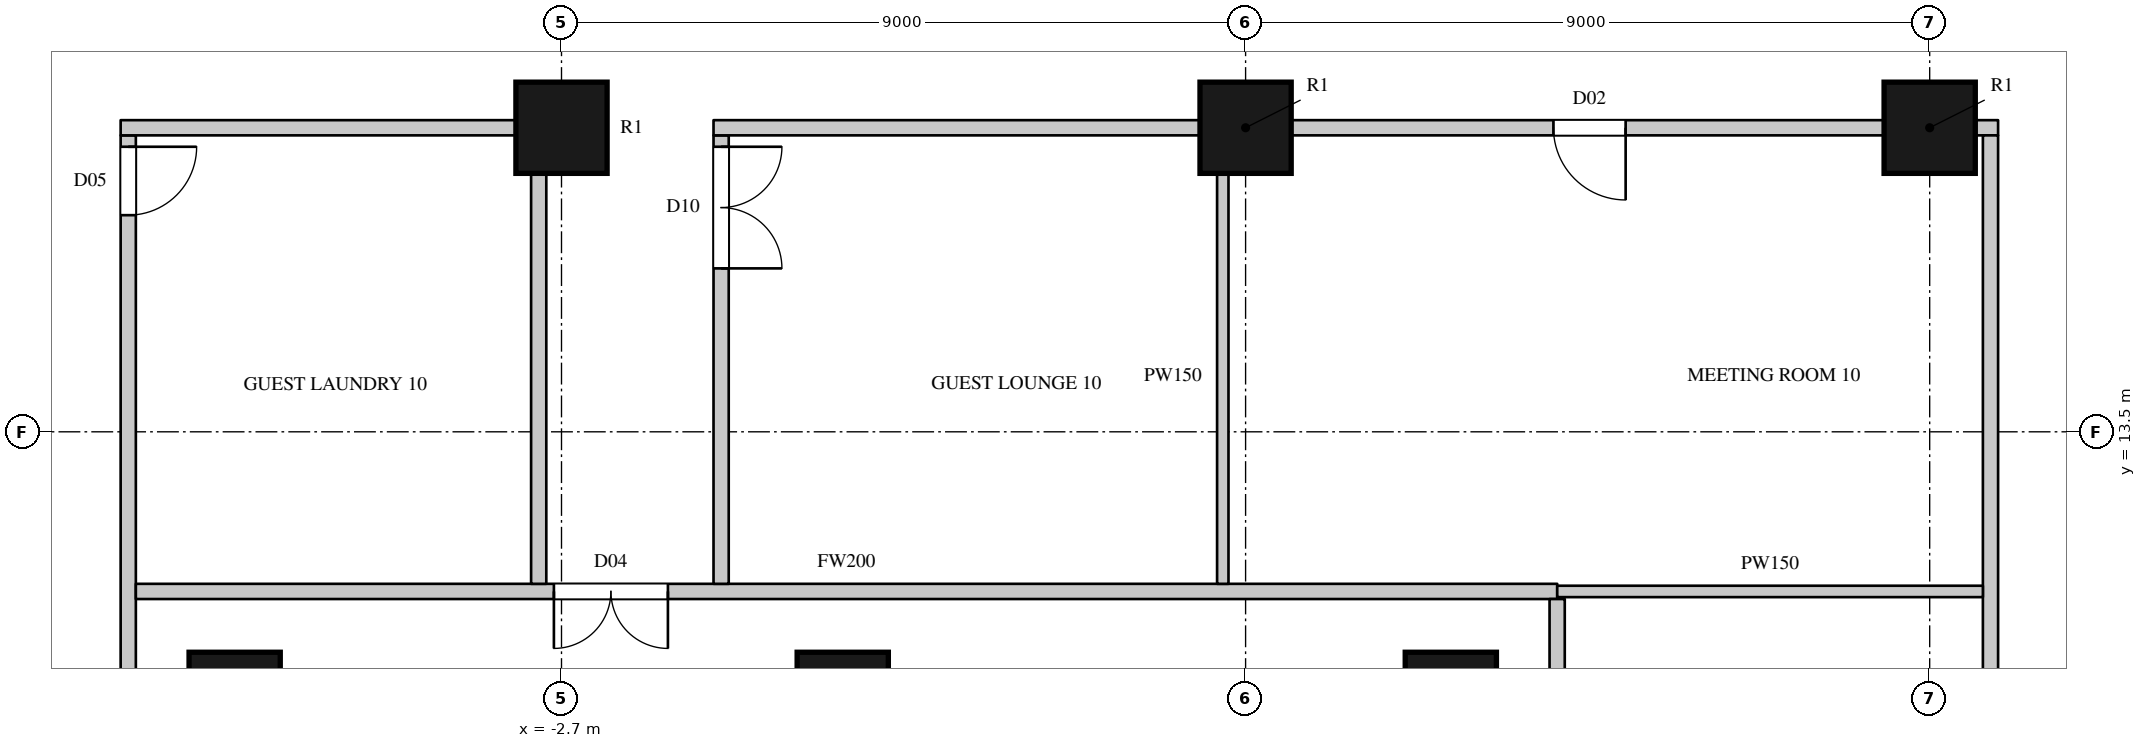
"""IFC4 building model, lengths in metres.
Left out: names, types, materials, properties, quantities, classifications, styles, units other than length and angle.
Written with IfcOpenShell. Run it as: python <this file> out.ifc"""

import sys

from ifc_helpers import new_model, si_unit, direction, frame, frame_2d, origin, origin_2d, place, context, subcontext, project, spatial, rectangle, circle, extrude, element, fill, save


model = new_model("IFC4")
c1 = context("Model", 3, precision=1e-05, world=origin(), true_north=direction((0.0, 1.0)))
c2 = subcontext(c1, "Body", "Model", "MODEL_VIEW")
j1 = project(units=[si_unit("LENGTHUNIT", "METRE"), si_unit("PLANEANGLEUNIT", "RADIAN")], contexts=[c1])
p1 = place(None, origin())
s1 = spatial("IfcSite", under=j1, at=p1, CompositionType="ELEMENT")
p2 = place(p1, origin())
s2 = spatial("IfcBuilding", under=s1, at=p2, CompositionType="ELEMENT")
p3 = place(p2, frame((0.0, 0.0, 66.3)))
s3 = spatial("IfcBuildingStorey", under=s2, at=p3, CompositionType="ELEMENT", Elevation=66.3)
for number, where, z_axis, x_axis in (
    (1, (-2.7, 17.5, 0.0), (0.0, 0.0, 1.0), (1.0, 0.0, 0.0)),
    (2, (6.3, 17.5, 0.0), (0.0, 0.0, 1.0), (1.0, 0.0, 0.0)),
    (3, (15.3, 17.5, 0.0), (0.0, 0.0, 1.0), (1.0, 0.0, 0.0)),
    (4, (-7.0, 10.0, 0.0), (0.0, 0.0, 1.0), (1.0, 0.0, 0.0)),
    (5, (1.0, 10.0, 0.0), (0.0, 0.0, 1.0), (1.0, 0.0, 0.0)),
    (6, (9.0, 10.0, 0.0), (0.0, 0.0, 1.0), (1.0, 0.0, 0.0)),
):
    element("IfcColumn", number, at=place(p3, frame(where, z_axis=z_axis, x_axis=x_axis)), inside=s3, PredefinedType="COLUMN", context=c2, shape_type="SweptSolid", body=[
        extrude(circle(Radius=0.6, at=origin_2d()), origin(), (0.0, 0.0, 1.0), 3.6),
    ])
p4 = place(p3, frame((-8.4, -17.4, 0.0), z_axis=(0.0, 0.0, 1.0), x_axis=(0.0, 1.0, 0.0)))
e7 = element("IfcWall", 7, at=p4, inside=s3, PredefinedType="PARTITIONING", context=c2, shape_type="SweptSolid", body=[
    extrude(rectangle(XDim=34.8, YDim=0.2, at=frame_2d((17.4, 0.0))), origin(), (0.0, 0.0, 1.0), 3.3),
])
p5 = place(p4, frame((21.15, 0.0, 0.0)))
e8 = element("IfcOpeningElement", 8, at=p5, cuts=e7, PredefinedType="OPENING", context=c2, shape_type="SweptSolid", body=[
    extrude(rectangle(XDim=1.5, YDim=2.2, at=frame_2d((0.75, 1.1))), frame((0.0, 0.11, 0.0), z_axis=(0.0, -1.0, 0.0), x_axis=(1.0, 0.0, 0.0)), (0.0, 0.0, 1.0), 0.22),
])
p6 = place(p4, frame((33.75, 0.0, 0.0)))
e9 = element("IfcOpeningElement", 9, at=p6, cuts=e7, PredefinedType="OPENING", context=c2, shape_type="SweptSolid", body=[
    extrude(rectangle(XDim=0.9, YDim=2.2, at=frame_2d((0.45, 1.1))), frame((0.0, 0.11, 0.0), z_axis=(0.0, -1.0, 0.0), x_axis=(1.0, 0.0, 0.0)), (0.0, 0.0, 1.0), 0.22),
])
p7 = place(p4, frame((0.15, 0.0, 0.0)))
e10 = element("IfcOpeningElement", 10, at=p7, cuts=e7, PredefinedType="OPENING", context=c2, shape_type="SweptSolid", body=[
    extrude(rectangle(XDim=0.95, YDim=2.2, at=frame_2d((0.475, 1.1))), frame((0.0, 0.11, 0.0), z_axis=(0.0, -1.0, 0.0), x_axis=(1.0, 0.0, 0.0)), (0.0, 0.0, 1.0), 0.22),
])
p8 = place(p3, frame((-8.3, 11.4, 0.0), z_axis=(0.0, 0.0, 1.0), x_axis=(1.0, 0.0, 0.0)))
e11 = element("IfcWall", 11, at=p8, inside=s3, PredefinedType="PARTITIONING", context=c2, shape_type="SweptSolid", body=[
    extrude(rectangle(XDim=18.7, YDim=0.2, at=frame_2d((9.35, 0.0))), origin(), (0.0, 0.0, 1.0), 3.3),
])
p9 = place(p8, frame((5.5, 0.0, 0.0)))
e12 = element("IfcOpeningElement", 12, at=p9, cuts=e11, PredefinedType="OPENING", context=c2, shape_type="SweptSolid", body=[
    extrude(rectangle(XDim=1.5, YDim=2.2, at=frame_2d((0.75, 1.1))), frame((0.0, 0.11, 0.0), z_axis=(0.0, -1.0, 0.0), x_axis=(1.0, 0.0, 0.0)), (0.0, 0.0, 1.0), 0.22),
])
p10 = place(p3, frame((-8.5, 17.5, 0.0), z_axis=(0.0, 0.0, 1.0), x_axis=(1.0, 0.0, 0.0)))
e13 = element("IfcWall", 13, at=p10, inside=s3, PredefinedType="PARTITIONING", context=c2, shape_type="SweptSolid", body=[
    extrude(rectangle(XDim=5.2, YDim=0.2, at=frame_2d((2.6, 0.0))), origin(), (0.0, 0.0, 1.0), 2.75),
])
p11 = place(p3, frame((-3.0, 11.5, 0.0), z_axis=(0.0, 0.0, 1.0), x_axis=(0.0, 1.0, 0.0)))
e14 = element("IfcWall", 14, at=p11, inside=s3, PredefinedType="PARTITIONING", context=c2, shape_type="SweptSolid", body=[
    extrude(rectangle(XDim=5.443, YDim=0.2, at=frame_2d((2.722, 0.0))), origin(), (0.0, 0.0, 1.0), 3.3),
])
p12 = place(p3, frame((-0.6, 11.5, 0.0), z_axis=(0.0, 0.0, 1.0), x_axis=(0.0, 1.0, 0.0)))
e15 = element("IfcWall", 15, at=p12, inside=s3, PredefinedType="PARTITIONING", context=c2, shape_type="SweptSolid", body=[
    extrude(rectangle(XDim=5.9, YDim=0.2, at=frame_2d((2.95, 0.0))), origin(), (0.0, 0.0, 1.0), 3.3),
])
p13 = place(p12, frame((4.15, 0.0, 0.0)))
e16 = element("IfcOpeningElement", 16, at=p13, cuts=e15, PredefinedType="OPENING", context=c2, shape_type="SweptSolid", body=[
    extrude(rectangle(XDim=1.6, YDim=2.4, at=frame_2d((0.8, 1.2))), frame((0.0, 0.11, 0.0), z_axis=(0.0, -1.0, 0.0), x_axis=(1.0, 0.0, 0.0)), (0.0, 0.0, 1.0), 0.22),
])
p14 = place(p3, frame((-0.7, 17.5, 0.0), z_axis=(0.0, 0.0, 1.0), x_axis=(1.0, 0.0, 0.0)))
e17 = element("IfcWall", 17, at=p14, inside=s3, PredefinedType="PARTITIONING", context=c2, shape_type="SweptSolid", body=[
    extrude(rectangle(XDim=6.4, YDim=0.2, at=frame_2d((3.2, 0.0))), origin(), (0.0, 0.0, 1.0), 2.75),
])
p15 = place(p3, frame((6.9, 17.5, 0.0), z_axis=(0.0, 0.0, 1.0), x_axis=(1.0, 0.0, 0.0)))
e18 = element("IfcWall", 18, at=p15, inside=s3, PredefinedType="PARTITIONING", context=c2, shape_type="SweptSolid", body=[
    extrude(rectangle(XDim=7.8, YDim=0.2, at=frame_2d((3.9, 0.0))), origin(), (0.0, 0.0, 1.0), 2.75),
])
p16 = place(p15, frame((3.45, 0.0, 0.0)))
e19 = element("IfcOpeningElement", 19, at=p16, cuts=e18, PredefinedType="OPENING", context=c2, shape_type="SweptSolid", body=[
    extrude(rectangle(XDim=0.95, YDim=2.2, at=frame_2d((0.475, 1.1))), frame((0.0, 0.11, 0.0), z_axis=(0.0, -1.0, 0.0), x_axis=(1.0, 0.0, 0.0)), (0.0, 0.0, 1.0), 0.22),
])
p17 = place(p3, frame((15.9, 17.5, 0.0), z_axis=(0.0, 0.0, 1.0), x_axis=(1.0, 0.0, 0.0)))
e20 = element("IfcWall", 20, at=p17, inside=s3, PredefinedType="PARTITIONING", context=c2, shape_type="SweptSolid", body=[
    extrude(rectangle(XDim=0.3, YDim=0.2, at=frame_2d((0.15, 0.0))), origin(), (0.0, 0.0, 1.0), 3.3),
])
p18 = place(p3, frame((10.399, -12.5, 0.0), z_axis=(0.0, 0.0, 1.0), x_axis=(0.0, 1.0, 0.0)))
e21 = element("IfcWall", 21, at=p18, inside=s3, PredefinedType="PARTITIONING", context=c2, shape_type="SweptSolid", body=[
    extrude(rectangle(XDim=23.8, YDim=0.2, at=frame_2d((11.9, 0.0))), origin(), (0.0, 0.0, 1.0), 3.3),
])
p19 = place(p18, frame((6.0, 0.0, 0.0)))
e22 = element("IfcOpeningElement", 22, at=p19, cuts=e21, PredefinedType="OPENING", context=c2, shape_type="SweptSolid", body=[
    extrude(rectangle(XDim=1.5, YDim=2.2, at=frame_2d((0.75, 1.1))), frame((0.0, 0.11, 0.0), z_axis=(0.0, -1.0, 0.0), x_axis=(1.0, 0.0, 0.0)), (0.0, 0.0, 1.0), 0.22),
])
p20 = place(p18, frame((17.5, 0.0, 0.0)))
e23 = element("IfcOpeningElement", 23, at=p20, cuts=e21, PredefinedType="OPENING", context=c2, shape_type="SweptSolid", body=[
    extrude(rectangle(XDim=1.5, YDim=2.2, at=frame_2d((0.75, 1.1))), frame((0.0, 0.11, 0.0), z_axis=(0.0, -1.0, 0.0), x_axis=(1.0, 0.0, 0.0)), (0.0, 0.0, 1.0), 0.22),
])
p21 = place(p18, frame((7.7, 0.0, 0.0)))
e24 = element("IfcOpeningElement", 24, at=p21, cuts=e21, PredefinedType="OPENING", context=c2, shape_type="SweptSolid", body=[
    extrude(rectangle(XDim=1.5, YDim=2.2, at=frame_2d((0.75, 1.1))), frame((0.0, 0.11, 0.0), z_axis=(0.0, -1.0, 0.0), x_axis=(1.0, 0.0, 0.0)), (0.0, 0.0, 1.0), 0.22),
])
p22 = place(p18, frame((13.15, 0.0, 0.0)))
e25 = element("IfcOpeningElement", 25, at=p22, cuts=e21, PredefinedType="OPENING", context=c2, shape_type="SweptSolid", body=[
    extrude(rectangle(XDim=1.5, YDim=2.2, at=frame_2d((0.75, 1.1))), frame((0.0, 0.11, 0.0), z_axis=(0.0, -1.0, 0.0), x_axis=(1.0, 0.0, 0.0)), (0.0, 0.0, 1.0), 0.22),
])
p23 = place(p3, frame((16.1, 6.825, 0.0), z_axis=(0.0, 0.0, 1.0), x_axis=(0.0, 1.0, 0.0)))
e26 = element("IfcWall", 26, at=p23, inside=s3, PredefinedType="PARTITIONING", context=c2, shape_type="SweptSolid", body=[
    extrude(rectangle(XDim=10.575, YDim=0.2, at=frame_2d((5.288, 0.0))), origin(), (0.0, 0.0, 1.0), 3.3),
])
p24 = place(p3, frame((6.0, 11.5, 0.0), z_axis=(0.0, 0.0, 1.0), x_axis=(0.0, 1.0, 0.0)))
e27 = element("IfcWall", 27, at=p24, inside=s3, PredefinedType="PARTITIONING", context=c2, shape_type="SweptSolid", body=[
    extrude(rectangle(XDim=5.453, YDim=0.15, at=frame_2d((2.727, 0.0))), origin(), (0.0, 0.0, 1.0), 3.3),
])
p25 = place(p3, frame((10.4, 11.4, 0.0), z_axis=(0.0, 0.0, 1.0), x_axis=(1.0, 0.0, 0.0)))
e28 = element("IfcWall", 28, at=p25, inside=s3, PredefinedType="PARTITIONING", context=c2, shape_type="SweptSolid", body=[
    extrude(rectangle(XDim=5.6, YDim=0.15, at=frame_2d((2.8, 0.0))), origin(), (0.0, 0.0, 1.0), 3.3),
])
p26 = place(p9, origin())
e29 = element("IfcDoor", 29, at=p26, inside=s3, OperationType="DOUBLE_DOOR_SINGLE_SWING", PredefinedType="DOOR", context=c2, shape_type="SweptSolid", body=[
    extrude(rectangle(XDim=1.5, YDim=2.2, at=frame_2d((0.75, 1.1))), frame((0.0, 0.025, 0.0), z_axis=(0.0, -1.0, 0.0), x_axis=(1.0, 0.0, 0.0)), (0.0, 0.0, 1.0), 0.05),
])
fill(e12, e29)
p27 = place(p6, origin())
e30 = element("IfcDoor", 30, at=p27, inside=s3, OperationType="SINGLE_SWING_LEFT", PredefinedType="DOOR", context=c2, shape_type="SweptSolid", body=[
    extrude(rectangle(XDim=0.9, YDim=2.2, at=frame_2d((0.45, 1.1))), frame((0.0, 0.025, 0.0), z_axis=(0.0, -1.0, 0.0), x_axis=(1.0, 0.0, 0.0)), (0.0, 0.0, 1.0), 0.05),
])
fill(e9, e30)
p28 = place(p13, origin())
e31 = element("IfcDoor", 31, at=p28, inside=s3, OperationType="DOUBLE_DOOR_SINGLE_SWING", PredefinedType="DOOR", context=c2, shape_type="SweptSolid", body=[
    extrude(rectangle(XDim=1.6, YDim=2.4, at=frame_2d((0.8, 1.2))), frame((0.0, 0.025, 0.0), z_axis=(0.0, -1.0, 0.0), x_axis=(1.0, 0.0, 0.0)), (0.0, 0.0, 1.0), 0.05),
])
fill(e16, e31)
p29 = place(p16, origin())
e32 = element("IfcDoor", 32, at=p29, inside=s3, OperationType="SINGLE_SWING_LEFT", PredefinedType="DOOR", context=c2, shape_type="SweptSolid", body=[
    extrude(rectangle(XDim=0.95, YDim=2.2, at=frame_2d((0.475, 1.1))), frame((0.0, 0.025, 0.0), z_axis=(0.0, -1.0, 0.0), x_axis=(1.0, 0.0, 0.0)), (0.0, 0.0, 1.0), 0.05),
])
fill(e19, e32)
save(model, sys.argv[1])
